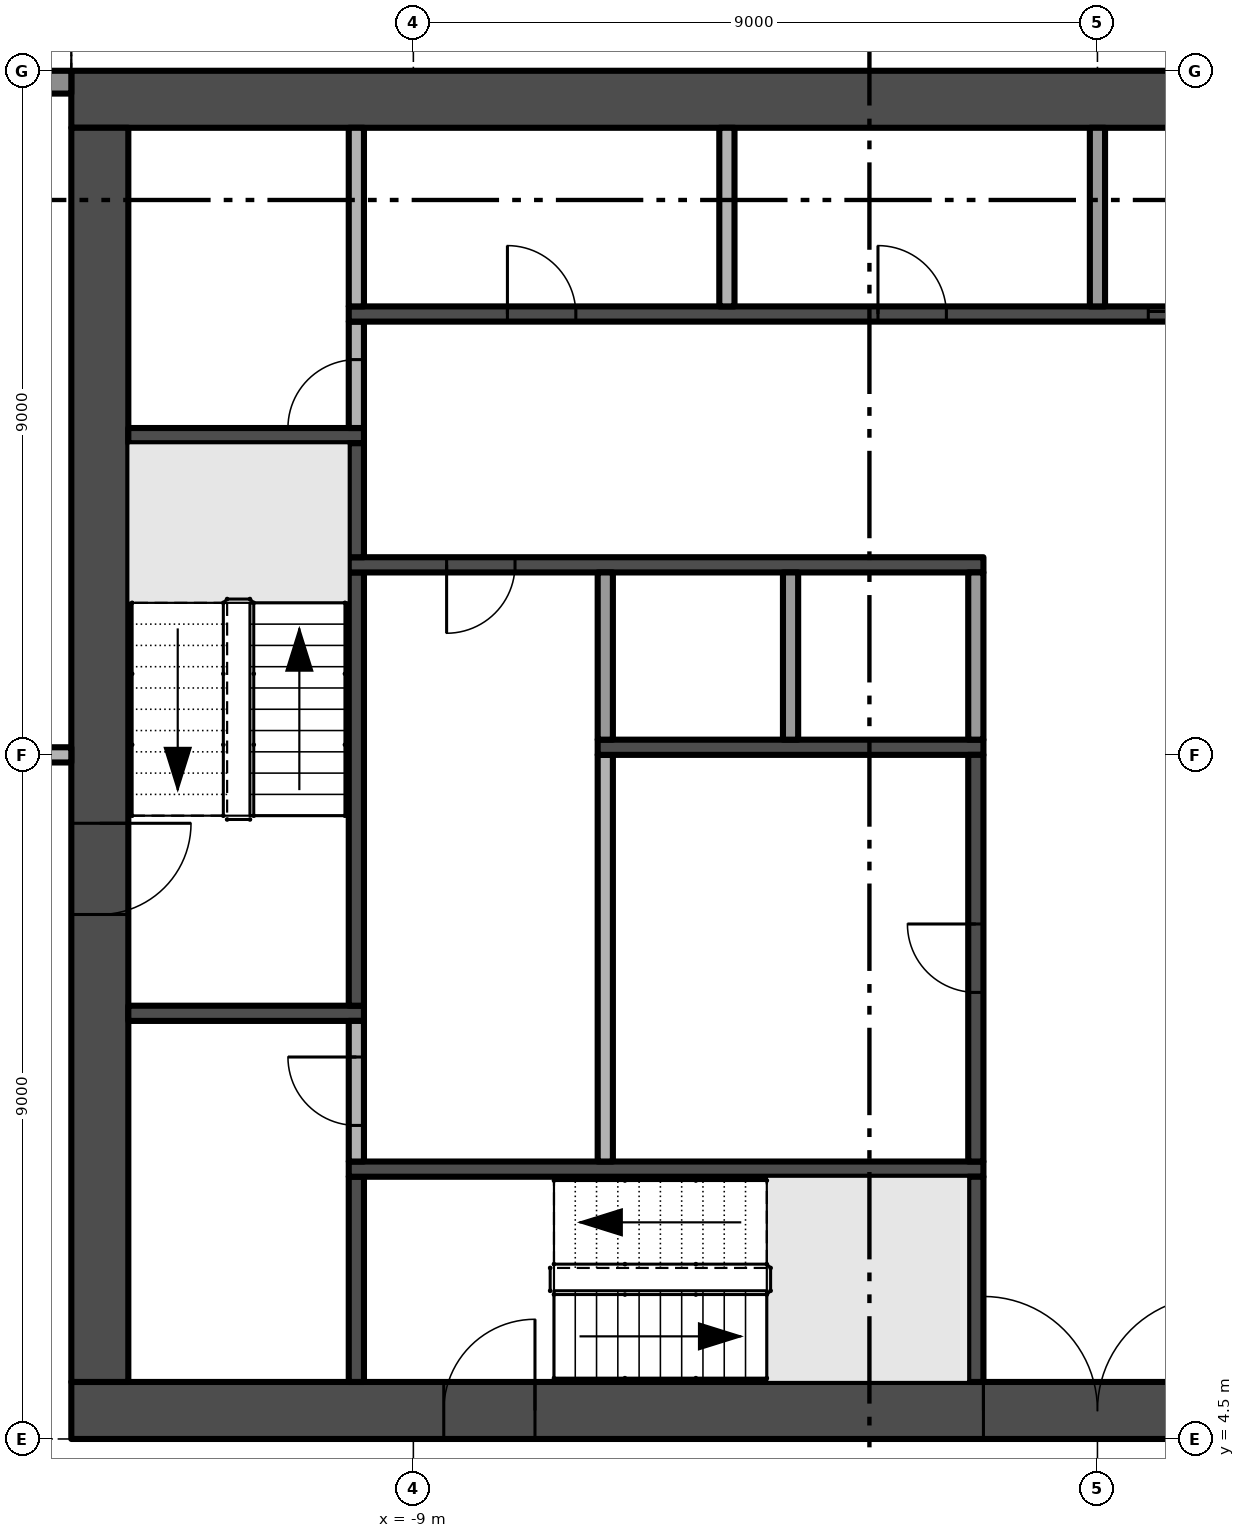
"""IFC4 building model, lengths in metres.
Left out: names, types, materials, properties, quantities, classifications, styles, units other than length and angle.
Written with IfcOpenShell. Run it as: python <this file> out.ifc"""

import sys

from ifc_helpers import new_model, si_unit, direction, frame, frame_2d, origin, place, context, subcontext, project, spatial, rectangle, extrude, element, fill, save


model = new_model("IFC4")
c1 = context("Model", 3, precision=1e-05, world=origin(), true_north=direction((0.0, 1.0)))
c2 = subcontext(c1, "Body", "Model", "MODEL_VIEW")
j1 = project(units=[si_unit("LENGTHUNIT", "METRE"), si_unit("PLANEANGLEUNIT", "RADIAN")], contexts=[c1])
p1 = place(None, origin())
s1 = spatial("IfcSite", under=j1, at=p1, CompositionType="ELEMENT")
p2 = place(p1, origin())
s2 = spatial("IfcBuilding", under=s1, at=p2, CompositionType="ELEMENT")
p3 = place(p2, frame((0.0, 0.0, 140.2)))
s3 = spatial("IfcBuildingStorey", under=s2, at=p3, CompositionType="ELEMENT", Elevation=140.2)
p4 = place(p3, frame((-13.5, 4.875, -0.3), z_axis=(0.0, 0.0, 1.0), x_axis=(1.0, 0.0, 0.0)))
e1 = element("IfcWall", 1, at=p4, inside=s3, PredefinedType="SHEAR", context=c2, shape_type="SweptSolid", body=[
    extrude(rectangle(XDim=27.0, YDim=0.75, at=frame_2d((13.5, 0.0))), origin(), (0.0, 0.0, 1.0), 3.8),
])
p5 = place(p4, frame((12.0, 0.0, 0.3)))
e2 = element("IfcOpeningElement", 2, at=p5, cuts=e1, PredefinedType="OPENING", context=c2, shape_type="SweptSolid", body=[
    extrude(rectangle(XDim=3.0, YDim=2.4, at=frame_2d((1.5, 1.2))), frame((0.0, 0.385, 0.0), z_axis=(0.0, -1.0, 0.0), x_axis=(1.0, 0.0, 0.0)), (0.0, 0.0, 1.0), 0.77),
])
p6 = place(p4, frame((4.9, 0.0, 0.3)))
e3 = element("IfcOpeningElement", 3, at=p6, cuts=e1, PredefinedType="OPENING", context=c2, shape_type="SweptSolid", body=[
    extrude(rectangle(XDim=1.2, YDim=2.2, at=frame_2d((0.6, 1.1))), frame((0.0, 0.385, 0.0), z_axis=(0.0, -1.0, 0.0), x_axis=(1.0, 0.0, 0.0)), (0.0, 0.0, 1.0), 0.77),
])
p7 = place(p4, frame((20.75, 0.0, 0.3)))
e4 = element("IfcOpeningElement", 4, at=p7, cuts=e1, PredefinedType="OPENING", context=c2, shape_type="SweptSolid", body=[
    extrude(rectangle(XDim=1.5, YDim=2.2, at=frame_2d((0.75, 1.1))), frame((0.0, 0.385, 0.0), z_axis=(0.0, -1.0, 0.0), x_axis=(1.0, 0.0, 0.0)), (0.0, 0.0, 1.0), 0.77),
])
p8 = place(p4, frame((17.4, 0.0, 0.3)))
e5 = element("IfcOpeningElement", 5, at=p8, cuts=e1, PredefinedType="OPENING", context=c2, shape_type="SweptSolid", body=[
    extrude(rectangle(XDim=1.2, YDim=2.2, at=frame_2d((0.6, 1.1))), frame((0.0, 0.385, 0.0), z_axis=(0.0, -1.0, 0.0), x_axis=(1.0, 0.0, 0.0)), (0.0, 0.0, 1.0), 0.77),
])
p9 = place(p3, frame((13.5, 22.125, -0.3), z_axis=(0.0, 0.0, 1.0), x_axis=(-1.0, 0.0, 0.0)))
e6 = element("IfcWall", 6, at=p9, inside=s3, PredefinedType="SHEAR", context=c2, shape_type="SweptSolid", body=[
    extrude(rectangle(XDim=27.0, YDim=0.75, at=frame_2d((13.5, 0.0))), origin(), (0.0, 0.0, 1.0), 3.8),
])
p10 = place(p3, frame((-13.125, 21.75, -0.3), z_axis=(0.0, 0.0, 1.0), x_axis=(0.0, -1.0, 0.0)))
e7 = element("IfcWall", 7, at=p10, inside=s3, PredefinedType="SHEAR", context=c2, shape_type="SweptSolid", body=[
    extrude(rectangle(XDim=16.5, YDim=0.75, at=frame_2d((8.25, 0.0))), origin(), (0.0, 0.0, 1.0), 3.8),
])
p11 = place(p10, frame((9.15, 0.0, 0.3)))
e8 = element("IfcOpeningElement", 8, at=p11, cuts=e7, PredefinedType="OPENING", context=c2, shape_type="SweptSolid", body=[
    extrude(rectangle(XDim=1.2, YDim=2.2, at=frame_2d((0.6, 1.1))), frame((0.0, 0.385, 0.0), z_axis=(0.0, -1.0, 0.0), x_axis=(1.0, 0.0, 0.0)), (0.0, 0.0, 1.0), 0.77),
])
p12 = place(p3, frame((-16.85, 22.35, 0.0), z_axis=(0.0, 0.0, 1.0), x_axis=(1.0, 0.0, 0.0)))
e9 = element("IfcWall", 9, at=p12, inside=s3, PredefinedType="SOLIDWALL", context=c2, shape_type="SweptSolid", body=[
    extrude(rectangle(XDim=3.35, YDim=0.3, at=frame_2d((1.675, 0.0))), origin(), (0.0, 0.0, 1.0), 3.5),
])
p13 = place(p12, frame((0.3, 0.0, 0.0)))
e10 = element("IfcOpeningElement", 10, at=p13, cuts=e9, PredefinedType="OPENING", context=c2, shape_type="SweptSolid", body=[
    extrude(rectangle(XDim=1.8, YDim=2.4, at=frame_2d((0.9, 1.2))), frame((0.0, 0.16, 0.0), z_axis=(0.0, -1.0, 0.0), x_axis=(1.0, 0.0, 0.0)), (0.0, 0.0, 1.0), 0.32),
])
for number, where, z_axis, x_axis in (
    (11, (-12.75, 10.1, 0.0), (0.0, 0.0, 1.0), (1.0, 0.0, 0.0)),
    (12, (-12.75, 17.7, 0.0), (0.0, 0.0, 1.0), (1.0, 0.0, 0.0)),
):
    element("IfcWall", number, at=place(p3, frame(where, z_axis=z_axis, x_axis=x_axis)), inside=s3, PredefinedType="SHEAR", context=c2, shape_type="SweptSolid", body=[
        extrude(rectangle(XDim=3.1, YDim=0.2, at=frame_2d((1.55, 0.0))), origin(), (0.0, 0.0, 1.0), 3.5),
    ])
p14 = place(p3, frame((-9.75, 5.25, 0.0), z_axis=(0.0, 0.0, 1.0), x_axis=(0.0, 1.0, 0.0)))
e13 = element("IfcWall", 13, at=p14, inside=s3, PredefinedType="SHEAR", context=c2, shape_type="SweptSolid", body=[
    extrude(rectangle(XDim=2.7, YDim=0.2, at=frame_2d((1.35, 0.0))), origin(), (0.0, 0.0, 1.0), 3.5),
])
p15 = place(p3, frame((-9.85, 8.05, 0.0), z_axis=(0.0, 0.0, 1.0), x_axis=(1.0, 0.0, 0.0)))
e14 = element("IfcWall", 14, at=p15, inside=s3, PredefinedType="SHEAR", context=c2, shape_type="SweptSolid", body=[
    extrude(rectangle(XDim=8.35, YDim=0.2, at=frame_2d((4.175, 0.0))), origin(), (0.0, 0.0, 1.0), 3.5),
])
p16 = place(p3, frame((-9.75, 8.15, 0.0), z_axis=(0.0, 0.0, 1.0), x_axis=(0.0, 1.0, 0.0)))
e15 = element("IfcWall", 15, at=p16, inside=s3, PredefinedType="PARTITIONING", context=c2, shape_type="SweptSolid", body=[
    extrude(rectangle(XDim=1.85, YDim=0.2, at=frame_2d((0.925, 0.0))), origin(), (0.0, 0.0, 1.0), 3.5),
])
p17 = place(p16, frame((0.475, 0.0, 0.0)))
e16 = element("IfcOpeningElement", 16, at=p17, cuts=e15, PredefinedType="OPENING", context=c2, shape_type="SweptSolid", body=[
    extrude(rectangle(XDim=0.9, YDim=2.1, at=frame_2d((0.45, 1.05))), frame((0.0, 0.11, 0.0), z_axis=(0.0, -1.0, 0.0), x_axis=(1.0, 0.0, 0.0)), (0.0, 0.0, 1.0), 0.22),
])
p18 = place(p3, frame((-9.75, 10.2, 0.0), z_axis=(0.0, 0.0, 1.0), x_axis=(0.0, 1.0, 0.0)))
e17 = element("IfcWall", 17, at=p18, inside=s3, PredefinedType="SHEAR", context=c2, shape_type="SweptSolid", body=[
    extrude(rectangle(XDim=5.7, YDim=0.2, at=frame_2d((2.85, 0.0))), origin(), (0.0, 0.0, 1.0), 3.5),
])
p19 = place(p3, frame((-1.5, 16.0, 0.0), z_axis=(0.0, 0.0, 1.0), x_axis=(-1.0, 0.0, 0.0)))
e18 = element("IfcWall", 18, at=p19, inside=s3, PredefinedType="SHEAR", context=c2, shape_type="SweptSolid", body=[
    extrude(rectangle(XDim=8.35, YDim=0.2, at=frame_2d((4.175, 0.0))), origin(), (0.0, 0.0, 1.0), 3.5),
])
p20 = place(p19, frame((6.162, 0.0, 0.0)))
e19 = element("IfcOpeningElement", 19, at=p20, cuts=e18, PredefinedType="OPENING", context=c2, shape_type="SweptSolid", body=[
    extrude(rectangle(XDim=0.9, YDim=2.1, at=frame_2d((0.45, 1.05))), frame((0.0, 0.11, 0.0), z_axis=(0.0, -1.0, 0.0), x_axis=(1.0, 0.0, 0.0)), (0.0, 0.0, 1.0), 0.22),
])
p21 = place(p3, frame((-9.75, 16.1, 0.0), z_axis=(0.0, 0.0, 1.0), x_axis=(0.0, 1.0, 0.0)))
e20 = element("IfcWall", 20, at=p21, inside=s3, PredefinedType="SHEAR", context=c2, shape_type="SweptSolid", body=[
    extrude(rectangle(XDim=1.5, YDim=0.2, at=frame_2d((0.75, 0.0))), origin(), (0.0, 0.0, 1.0), 3.5),
])
p22 = place(p3, frame((-9.75, 17.8, 0.0), z_axis=(0.0, 0.0, 1.0), x_axis=(0.0, 1.0, 0.0)))
e21 = element("IfcWall", 21, at=p22, inside=s3, PredefinedType="PARTITIONING", context=c2, shape_type="SweptSolid", body=[
    extrude(rectangle(XDim=1.4, YDim=0.2, at=frame_2d((0.7, 0.0))), origin(), (0.0, 0.0, 1.0), 3.5),
])
p23 = place(p22, origin())
e22 = element("IfcOpeningElement", 22, at=p23, cuts=e21, PredefinedType="OPENING", context=c2, shape_type="SweptSolid", body=[
    extrude(rectangle(XDim=0.9, YDim=2.1, at=frame_2d((0.45, 1.05))), frame((0.0, 0.11, 0.0), z_axis=(0.0, -1.0, 0.0), x_axis=(1.0, 0.0, 0.0)), (0.0, 0.0, 1.0), 0.22),
])
p24 = place(p3, frame((-9.85, 19.3, 0.0), z_axis=(0.0, 0.0, 1.0), x_axis=(1.0, 0.0, 0.0)))
e23 = element("IfcWall", 23, at=p24, inside=s3, PredefinedType="SHEAR", context=c2, shape_type="SweptSolid", body=[
    extrude(rectangle(XDim=19.7, YDim=0.2, at=frame_2d((9.85, 0.0))), origin(), (0.0, 0.0, 1.0), 3.5),
])
p25 = place(p24, frame((10.519, 0.0, 0.0)))
e24 = element("IfcOpeningElement", 24, at=p25, cuts=e23, PredefinedType="OPENING", context=c2, shape_type="SweptSolid", body=[
    extrude(rectangle(XDim=1.1, YDim=2.1, at=frame_2d((0.55, 1.05))), frame((0.0, 0.11, 0.0), z_axis=(0.0, -1.0, 0.0), x_axis=(1.0, 0.0, 0.0)), (0.0, 0.0, 1.0), 0.22),
])
p26 = place(p24, frame((12.956, 0.0, 0.0)))
e25 = element("IfcOpeningElement", 25, at=p26, cuts=e23, PredefinedType="OPENING", context=c2, shape_type="SweptSolid", body=[
    extrude(rectangle(XDim=1.1, YDim=2.1, at=frame_2d((0.55, 1.05))), frame((0.0, 0.11, 0.0), z_axis=(0.0, -1.0, 0.0), x_axis=(1.0, 0.0, 0.0)), (0.0, 0.0, 1.0), 0.22),
])
p27 = place(p24, frame((15.394, 0.0, 0.0)))
e26 = element("IfcOpeningElement", 26, at=p27, cuts=e23, PredefinedType="OPENING", context=c2, shape_type="SweptSolid", body=[
    extrude(rectangle(XDim=1.1, YDim=2.1, at=frame_2d((0.55, 1.05))), frame((0.0, 0.11, 0.0), z_axis=(0.0, -1.0, 0.0), x_axis=(1.0, 0.0, 0.0)), (0.0, 0.0, 1.0), 0.22),
])
p28 = place(p24, frame((17.831, 0.0, 0.0)))
e27 = element("IfcOpeningElement", 27, at=p28, cuts=e23, PredefinedType="OPENING", context=c2, shape_type="SweptSolid", body=[
    extrude(rectangle(XDim=1.1, YDim=2.1, at=frame_2d((0.55, 1.05))), frame((0.0, 0.11, 0.0), z_axis=(0.0, -1.0, 0.0), x_axis=(1.0, 0.0, 0.0)), (0.0, 0.0, 1.0), 0.22),
])
p29 = place(p24, frame((2.087, 0.0, 0.0)))
e28 = element("IfcOpeningElement", 28, at=p29, cuts=e23, PredefinedType="OPENING", context=c2, shape_type="SweptSolid", body=[
    extrude(rectangle(XDim=0.9, YDim=2.1, at=frame_2d((0.45, 1.05))), frame((0.0, 0.11, 0.0), z_axis=(0.0, -1.0, 0.0), x_axis=(1.0, 0.0, 0.0)), (0.0, 0.0, 1.0), 0.22),
])
p30 = place(p24, frame((6.963, 0.0, 0.0)))
e29 = element("IfcOpeningElement", 29, at=p30, cuts=e23, PredefinedType="OPENING", context=c2, shape_type="SweptSolid", body=[
    extrude(rectangle(XDim=0.9, YDim=2.1, at=frame_2d((0.45, 1.05))), frame((0.0, 0.11, 0.0), z_axis=(0.0, -1.0, 0.0), x_axis=(1.0, 0.0, 0.0)), (0.0, 0.0, 1.0), 0.22),
])
p31 = place(p3, frame((-9.75, 19.4, 0.0), z_axis=(0.0, 0.0, 1.0), x_axis=(0.0, 1.0, 0.0)))
e30 = element("IfcWall", 30, at=p31, inside=s3, PredefinedType="PARTITIONING", context=c2, shape_type="SweptSolid", body=[
    extrude(rectangle(XDim=2.35, YDim=0.2, at=frame_2d((1.175, 0.0))), origin(), (0.0, 0.0, 1.0), 3.5),
])
p32 = place(p3, frame((-6.475, 8.15, 0.0), z_axis=(0.0, 0.0, 1.0), x_axis=(0.0, 1.0, 0.0)))
e31 = element("IfcWall", 31, at=p32, inside=s3, PredefinedType="PARTITIONING", context=c2, shape_type="SweptSolid", body=[
    extrude(rectangle(XDim=5.35, YDim=0.2, at=frame_2d((2.675, 0.0))), origin(), (0.0, 0.0, 1.0), 3.5),
])
p33 = place(p3, frame((-6.575, 13.6, 0.0), z_axis=(0.0, 0.0, 1.0), x_axis=(1.0, 0.0, 0.0)))
e32 = element("IfcWall", 32, at=p33, inside=s3, PredefinedType="SHEAR", context=c2, shape_type="SweptSolid", body=[
    extrude(rectangle(XDim=5.075, YDim=0.2, at=frame_2d((2.538, 0.0))), origin(), (0.0, 0.0, 1.0), 3.5),
])
p34 = place(p3, frame((-6.475, 13.7, 0.0), z_axis=(0.0, 0.0, 1.0), x_axis=(0.0, 1.0, 0.0)))
e33 = element("IfcWall", 33, at=p34, inside=s3, PredefinedType="PARTITIONING", context=c2, shape_type="SweptSolid", body=[
    extrude(rectangle(XDim=2.2, YDim=0.2, at=frame_2d((1.1, 0.0))), origin(), (0.0, 0.0, 1.0), 3.5),
])
p35 = place(p3, frame((-4.875, 19.4, 0.0), z_axis=(0.0, 0.0, 1.0), x_axis=(0.0, 1.0, 0.0)))
e34 = element("IfcWall", 34, at=p35, inside=s3, PredefinedType="PARTITIONING", context=c2, shape_type="SweptSolid", body=[
    extrude(rectangle(XDim=2.35, YDim=0.2, at=frame_2d((1.175, 0.0))), origin(), (0.0, 0.0, 1.0), 3.5),
])
p36 = place(p3, frame((-4.037, 13.7, 0.0), z_axis=(0.0, 0.0, 1.0), x_axis=(0.0, 1.0, 0.0)))
e35 = element("IfcWall", 35, at=p36, inside=s3, PredefinedType="PARTITIONING", context=c2, shape_type="SweptSolid", body=[
    extrude(rectangle(XDim=2.2, YDim=0.2, at=frame_2d((1.1, 0.0))), origin(), (0.0, 0.0, 1.0), 3.5),
])
p37 = place(p3, frame((-1.6, 5.25, 0.0), z_axis=(0.0, 0.0, 1.0), x_axis=(0.0, 1.0, 0.0)))
e36 = element("IfcWall", 36, at=p37, inside=s3, PredefinedType="SHEAR", context=c2, shape_type="SweptSolid", body=[
    extrude(rectangle(XDim=2.7, YDim=0.2, at=frame_2d((1.35, 0.0))), origin(), (0.0, 0.0, 1.0), 3.5),
])
p38 = place(p3, frame((-1.6, 8.15, 0.0), z_axis=(0.0, 0.0, 1.0), x_axis=(0.0, 1.0, 0.0)))
e37 = element("IfcWall", 37, at=p38, inside=s3, PredefinedType="SHEAR", context=c2, shape_type="SweptSolid", body=[
    extrude(rectangle(XDim=5.35, YDim=0.2, at=frame_2d((2.675, 0.0))), origin(), (0.0, 0.0, 1.0), 3.5),
])
p39 = place(p38, frame((2.225, 0.0, 0.0)))
e38 = element("IfcOpeningElement", 38, at=p39, cuts=e37, PredefinedType="OPENING", context=c2, shape_type="SweptSolid", body=[
    extrude(rectangle(XDim=0.9, YDim=2.1, at=frame_2d((0.45, 1.05))), frame((0.0, 0.11, 0.0), z_axis=(0.0, -1.0, 0.0), x_axis=(1.0, 0.0, 0.0)), (0.0, 0.0, 1.0), 0.22),
])
p40 = place(p3, frame((-1.6, 13.7, 0.0), z_axis=(0.0, 0.0, 1.0), x_axis=(0.0, 1.0, 0.0)))
e39 = element("IfcWall", 39, at=p40, inside=s3, PredefinedType="PARTITIONING", context=c2, shape_type="SweptSolid", body=[
    extrude(rectangle(XDim=2.2, YDim=0.2, at=frame_2d((1.1, 0.0))), origin(), (0.0, 0.0, 1.0), 3.5),
])
p41 = place(p3, frame((0.0, 19.4, 0.0), z_axis=(0.0, 0.0, 1.0), x_axis=(0.0, 1.0, 0.0)))
e40 = element("IfcWall", 40, at=p41, inside=s3, PredefinedType="PARTITIONING", context=c2, shape_type="SweptSolid", body=[
    extrude(rectangle(XDim=2.35, YDim=0.2, at=frame_2d((1.175, 0.0))), origin(), (0.0, 0.0, 1.0), 3.5),
])
p42 = place(p3, frame((-17.375, 13.5, 0.0), z_axis=(0.0, 0.0, 1.0), x_axis=(1.0, 0.0, 0.0)))
e41 = element("IfcWall", 41, at=p42, inside=s3, PredefinedType="PARTITIONING", context=c2, shape_type="SweptSolid", body=[
    extrude(rectangle(XDim=3.875, YDim=0.2, at=frame_2d((1.938, 0.0))), origin(), (0.0, 0.0, 1.0), 3.5),
])
p43 = place(p42, frame((1.35, 0.0, 0.0)))
e42 = element("IfcOpeningElement", 42, at=p43, cuts=e41, PredefinedType="OPENING", context=c2, shape_type="SweptSolid", body=[
    extrude(rectangle(XDim=0.9, YDim=2.1, at=frame_2d((0.45, 1.05))), frame((0.0, 0.11, 0.0), z_axis=(0.0, -1.0, 0.0), x_axis=(1.0, 0.0, 0.0)), (0.0, 0.0, 1.0), 0.22),
])
p44 = place(p5, frame((3.0, 0.0, 0.0), z_axis=(0.0, 0.0, 1.0), x_axis=(-1.0, 0.0, 0.0)))
e43 = element("IfcDoor", 43, at=p44, inside=s3, OperationType="DOUBLE_DOOR_SINGLE_SWING", PredefinedType="DOOR", context=c2, shape_type="SweptSolid", body=[
    extrude(rectangle(XDim=3.0, YDim=2.4, at=frame_2d((1.5, 1.2))), frame((0.0, 0.025, 0.0), z_axis=(0.0, -1.0, 0.0), x_axis=(1.0, 0.0, 0.0)), (0.0, 0.0, 1.0), 0.05),
])
fill(e2, e43)
p45 = place(p11, frame((1.2, 0.0, 0.0), z_axis=(0.0, 0.0, 1.0), x_axis=(-1.0, 0.0, 0.0)))
e44 = element("IfcDoor", 44, at=p45, inside=s3, OperationType="SINGLE_SWING_RIGHT", PredefinedType="DOOR", context=c2, shape_type="SweptSolid", body=[
    extrude(rectangle(XDim=1.2, YDim=2.2, at=frame_2d((0.6, 1.1))), frame((0.0, 0.025, 0.0), z_axis=(0.0, -1.0, 0.0), x_axis=(1.0, 0.0, 0.0)), (0.0, 0.0, 1.0), 0.05),
])
fill(e8, e44)
p46 = place(p6, frame((1.2, 0.0, 0.0), z_axis=(0.0, 0.0, 1.0), x_axis=(-1.0, 0.0, 0.0)))
e45 = element("IfcDoor", 45, at=p46, inside=s3, OperationType="SINGLE_SWING_LEFT", PredefinedType="DOOR", context=c2, shape_type="SweptSolid", body=[
    extrude(rectangle(XDim=1.2, YDim=2.2, at=frame_2d((0.6, 1.1))), frame((0.0, 0.025, 0.0), z_axis=(0.0, -1.0, 0.0), x_axis=(1.0, 0.0, 0.0)), (0.0, 0.0, 1.0), 0.05),
])
fill(e3, e45)
p47 = place(p25, origin())
e46 = element("IfcDoor", 46, at=p47, inside=s3, OperationType="SLIDING_TO_RIGHT", PredefinedType="DOOR", context=c2, shape_type="SweptSolid", body=[
    extrude(rectangle(XDim=1.1, YDim=2.1, at=frame_2d((0.55, 1.05))), frame((0.0, 0.025, 0.0), z_axis=(0.0, -1.0, 0.0), x_axis=(1.0, 0.0, 0.0)), (0.0, 0.0, 1.0), 0.05),
])
fill(e24, e46)
p48 = place(p20, origin())
e47 = element("IfcDoor", 47, at=p48, inside=s3, OperationType="SINGLE_SWING_RIGHT", PredefinedType="DOOR", context=c2, shape_type="SweptSolid", body=[
    extrude(rectangle(XDim=0.9, YDim=2.1, at=frame_2d((0.45, 1.05))), frame((0.0, 0.025, 0.0), z_axis=(0.0, -1.0, 0.0), x_axis=(1.0, 0.0, 0.0)), (0.0, 0.0, 1.0), 0.05),
])
fill(e19, e47)
p49 = place(p39, origin())
e48 = element("IfcDoor", 48, at=p49, inside=s3, OperationType="SINGLE_SWING_RIGHT", PredefinedType="DOOR", context=c2, shape_type="SweptSolid", body=[
    extrude(rectangle(XDim=0.9, YDim=2.1, at=frame_2d((0.45, 1.05))), frame((0.0, 0.025, 0.0), z_axis=(0.0, -1.0, 0.0), x_axis=(1.0, 0.0, 0.0)), (0.0, 0.0, 1.0), 0.05),
])
fill(e38, e48)
p50 = place(p23, origin())
e49 = element("IfcDoor", 49, at=p50, inside=s3, OperationType="SINGLE_SWING_LEFT", PredefinedType="DOOR", context=c2, shape_type="SweptSolid", body=[
    extrude(rectangle(XDim=0.9, YDim=2.1, at=frame_2d((0.45, 1.05))), frame((0.0, 0.025, 0.0), z_axis=(0.0, -1.0, 0.0), x_axis=(1.0, 0.0, 0.0)), (0.0, 0.0, 1.0), 0.05),
])
fill(e22, e49)
p51 = place(p29, origin())
e50 = element("IfcDoor", 50, at=p51, inside=s3, OperationType="SINGLE_SWING_LEFT", PredefinedType="DOOR", context=c2, shape_type="SweptSolid", body=[
    extrude(rectangle(XDim=0.9, YDim=2.1, at=frame_2d((0.45, 1.05))), frame((0.0, 0.025, 0.0), z_axis=(0.0, -1.0, 0.0), x_axis=(1.0, 0.0, 0.0)), (0.0, 0.0, 1.0), 0.05),
])
fill(e28, e50)
p52 = place(p30, origin())
e51 = element("IfcDoor", 51, at=p52, inside=s3, OperationType="SINGLE_SWING_LEFT", PredefinedType="DOOR", context=c2, shape_type="SweptSolid", body=[
    extrude(rectangle(XDim=0.9, YDim=2.1, at=frame_2d((0.45, 1.05))), frame((0.0, 0.025, 0.0), z_axis=(0.0, -1.0, 0.0), x_axis=(1.0, 0.0, 0.0)), (0.0, 0.0, 1.0), 0.05),
])
fill(e29, e51)
p53 = place(p17, origin())
e52 = element("IfcDoor", 52, at=p53, inside=s3, OperationType="SINGLE_SWING_RIGHT", PredefinedType="DOOR", context=c2, shape_type="SweptSolid", body=[
    extrude(rectangle(XDim=0.9, YDim=2.1, at=frame_2d((0.45, 1.05))), frame((0.0, 0.025, 0.0), z_axis=(0.0, -1.0, 0.0), x_axis=(1.0, 0.0, 0.0)), (0.0, 0.0, 1.0), 0.05),
])
fill(e16, e52)
save(model, sys.argv[1])
